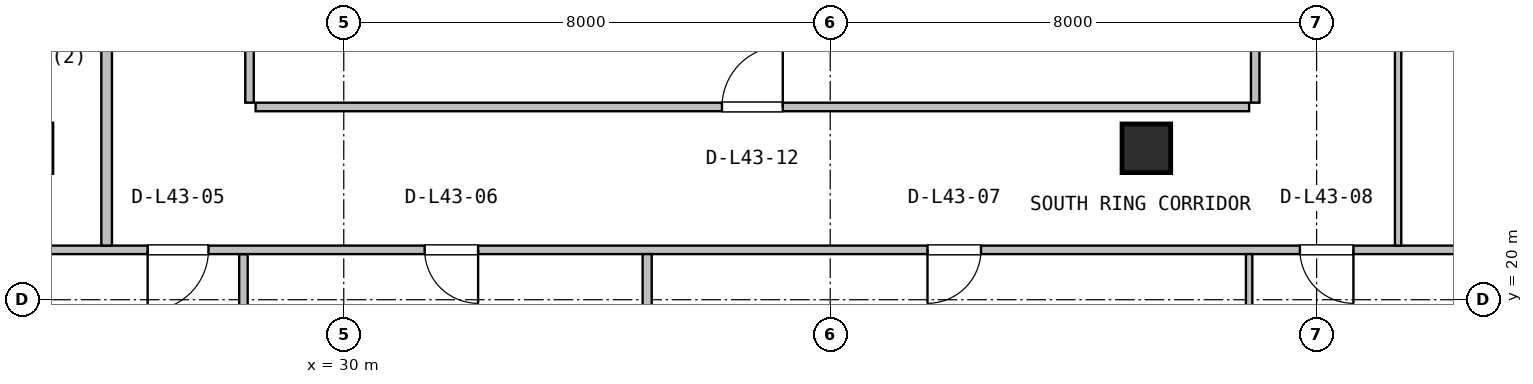
"""IFC4 building model, lengths in metres.
Left out: names, types, materials, properties, quantities, classifications, styles, units other than length and angle.
Written with IfcOpenShell. Run it as: python <this file> out.ifc"""

import sys

from ifc_helpers import new_model, si_unit, direction, frame, frame_2d, origin, origin_2d, place, context, subcontext, project, spatial, rectangle, extrude, source, transform, mapped, element, fill, save


model = new_model("IFC4")
c1 = context("Model", 3, precision=1e-05, world=origin(), true_north=direction((0.0, 1.0)))
c2 = subcontext(c1, "Body", "Model", "MODEL_VIEW")
j1 = project(units=[si_unit("LENGTHUNIT", "METRE"), si_unit("PLANEANGLEUNIT", "RADIAN")], contexts=[c1])
p1 = place(None, origin())
s1 = spatial("IfcSite", under=j1, at=p1, CompositionType="ELEMENT")
p2 = place(p1, origin())
s2 = spatial("IfcBuilding", under=s1, at=p2, CompositionType="ELEMENT")
p3 = place(p2, frame((0.0, 0.0, 176.2)))
s3 = spatial("IfcBuildingStorey", under=s2, at=p3, CompositionType="ELEMENT", Elevation=176.2)
m1 = source(origin(), c2, "Body", "SweptSolid", [
    extrude(rectangle(XDim=0.8, YDim=0.8, at=origin_2d()), origin(), (0.0, 0.0, 1.0), 3.8),
])
for number, where, z_axis, x_axis in (
    (1, (24.8, 22.49, 0.0), (0.0, 0.0, 1.0), (1.0, 0.0, 0.0)),
    (2, (43.2, 22.49, 0.0), (0.0, 0.0, 1.0), (1.0, 0.0, 0.0)),
):
    element("IfcColumn", number, at=place(p3, frame(where, z_axis=z_axis, x_axis=x_axis)), inside=s3, PredefinedType="COLUMN", context=c2, shape_type="MappedRepresentation", body=[
        mapped(m1, transform((0.0, 0.0, 0.0), x_axis=(1.0, 0.0, 0.0), y_axis=(0.0, 1.0, 0.0), z_axis=(0.0, 0.0, 1.0), scale=1.0)),
    ])
p4 = place(p3, frame((28.35, 7.38, 0.0), z_axis=(0.0, 0.0, 1.0), x_axis=(0.0, 1.0, 0.0)))
e3 = element("IfcWall", 3, at=p4, inside=s3, PredefinedType="PARTITIONING", context=c2, shape_type="SweptSolid", body=[
    extrude(rectangle(XDim=13.37, YDim=0.14, at=frame_2d((6.685, 0.0))), origin(), (0.0, 0.0, 1.0), 3.108),
])
p5 = place(p3, frame((7.18, 20.82, 0.0), z_axis=(0.0, 0.0, 1.0), x_axis=(1.0, 0.0, 0.0)))
e4 = element("IfcWall", 4, at=p5, inside=s3, PredefinedType="PARTITIONING", context=c2, shape_type="SweptSolid", body=[
    extrude(rectangle(XDim=53.64, YDim=0.14, at=frame_2d((26.82, 0.0))), origin(), (0.0, 0.0, 1.0), 2.909),
])
p6 = place(p5, frame((19.595, 0.0, 0.0)))
e5 = element("IfcOpeningElement", 5, at=p6, cuts=e4, PredefinedType="OPENING", context=c2, shape_type="SweptSolid", body=[
    extrude(rectangle(XDim=1.0, YDim=2.1, at=frame_2d((0.5, 1.05))), frame((0.0, 0.08, 0.0), z_axis=(0.0, -1.0, 0.0), x_axis=(1.0, 0.0, 0.0)), (0.0, 0.0, 1.0), 0.16),
])
p7 = place(p5, frame((24.15, 0.0, 0.0)))
e6 = element("IfcOpeningElement", 6, at=p7, cuts=e4, PredefinedType="OPENING", context=c2, shape_type="SweptSolid", body=[
    extrude(rectangle(XDim=0.88, YDim=2.06, at=frame_2d((0.44, 1.03))), frame((0.0, 0.08, 0.0), z_axis=(0.0, -1.0, 0.0), x_axis=(1.0, 0.0, 0.0)), (0.0, 0.0, 1.0), 0.16),
])
p8 = place(p5, frame((32.42, 0.0, 0.0)))
e7 = element("IfcOpeningElement", 7, at=p8, cuts=e4, PredefinedType="OPENING", context=c2, shape_type="SweptSolid", body=[
    extrude(rectangle(XDim=0.88, YDim=2.06, at=frame_2d((0.44, 1.03))), frame((0.0, 0.08, 0.0), z_axis=(0.0, -1.0, 0.0), x_axis=(1.0, 0.0, 0.0)), (0.0, 0.0, 1.0), 0.16),
])
p9 = place(p5, frame((38.545, 0.0, 0.0)))
e8 = element("IfcOpeningElement", 8, at=p9, cuts=e4, PredefinedType="OPENING", context=c2, shape_type="SweptSolid", body=[
    extrude(rectangle(XDim=0.88, YDim=2.06, at=frame_2d((0.44, 1.03))), frame((0.0, 0.08, 0.0), z_axis=(0.0, -1.0, 0.0), x_axis=(1.0, 0.0, 0.0)), (0.0, 0.0, 1.0), 0.16),
])
p10 = place(p3, frame((34.99, 7.38, 0.0), z_axis=(0.0, 0.0, 1.0), x_axis=(0.0, 1.0, 0.0)))
e9 = element("IfcWall", 9, at=p10, inside=s3, PredefinedType="PARTITIONING", context=c2, shape_type="SweptSolid", body=[
    extrude(rectangle(XDim=13.37, YDim=0.15, at=frame_2d((6.685, 0.0))), origin(), (0.0, 0.0, 1.0), 3.108),
])
p11 = place(p3, frame((44.89, 7.38, 0.0), z_axis=(0.0, 0.0, 1.0), x_axis=(0.0, 1.0, 0.0)))
e10 = element("IfcWall", 10, at=p11, inside=s3, PredefinedType="PARTITIONING", context=c2, shape_type="SweptSolid", body=[
    extrude(rectangle(XDim=13.37, YDim=0.105, at=frame_2d((6.685, 0.0))), origin(), (0.0, 0.0, 1.0), 3.108),
])
p12 = place(p3, frame((26.1, 20.89, 0.0), z_axis=(0.0, 0.0, 1.0), x_axis=(0.0, 1.0, 0.0)))
e11 = element("IfcWall", 11, at=p12, inside=s3, PredefinedType="PARTITIONING", context=c2, shape_type="SweptSolid", body=[
    extrude(rectangle(XDim=12.407, YDim=0.175, at=frame_2d((6.204, 0.0))), origin(), (0.0, 0.0, 1.0), 2.909),
])
p13 = place(p12, frame((5.67, 0.0, 0.0)))
e12 = element("IfcOpeningElement", 12, at=p13, cuts=e11, PredefinedType="OPENING", context=c2, shape_type="SweptSolid", body=[
    extrude(rectangle(XDim=1.05, YDim=2.1, at=frame_2d((0.525, 1.05))), frame((0.0, 0.098, 0.0), z_axis=(0.0, -1.0, 0.0), x_axis=(1.0, 0.0, 0.0)), (0.0, 0.0, 1.0), 0.195),
])
p14 = place(p3, frame((28.55, 23.17, 0.0), z_axis=(0.0, 0.0, 1.0), x_axis=(1.0, 0.0, 0.0)))
e13 = element("IfcWall", 13, at=p14, inside=s3, PredefinedType="PARTITIONING", context=c2, shape_type="SweptSolid", body=[
    extrude(rectangle(XDim=16.34, YDim=0.14, at=frame_2d((8.17, 0.0))), origin(), (0.0, 0.0, 1.0), 2.909),
])
p15 = place(p14, frame((7.67, 0.0, 0.0)))
e14 = element("IfcOpeningElement", 14, at=p15, cuts=e13, PredefinedType="OPENING", context=c2, shape_type="SweptSolid", body=[
    extrude(rectangle(XDim=1.0, YDim=2.1, at=frame_2d((0.5, 1.05))), frame((0.0, 0.08, 0.0), z_axis=(0.0, -1.0, 0.0), x_axis=(1.0, 0.0, 0.0)), (0.0, 0.0, 1.0), 0.16),
])
for number, where, z_axis, x_axis in (
    (15, (44.99, 23.24, 0.0), (0.0, 0.0, 1.0), (0.0, 1.0, 0.0)),
    (16, (28.45, 23.24, 0.0), (0.0, 0.0, 1.0), (0.0, 1.0, 0.0)),
):
    element("IfcWall", number, at=place(p3, frame(where, z_axis=z_axis, x_axis=x_axis)), inside=s3, PredefinedType="PARTITIONING", context=c2, shape_type="SweptSolid", body=[
        extrude(rectangle(XDim=10.035, YDim=0.14, at=frame_2d((5.018, 0.0))), origin(), (0.0, 0.0, 1.0), 3.222),
    ])
p16 = place(p3, frame((47.34, 20.89, 0.0), z_axis=(0.0, 0.0, 1.0), x_axis=(0.0, 1.0, 0.0)))
e17 = element("IfcWall", 17, at=p16, inside=s3, PredefinedType="PARTITIONING", context=c2, shape_type="SweptSolid", body=[
    extrude(rectangle(XDim=12.407, YDim=0.105, at=frame_2d((6.204, 0.0))), origin(), (0.0, 0.0, 1.0), 3.222),
])
p17 = place(p16, frame((3.24, 0.0, 0.0)))
e18 = element("IfcOpeningElement", 18, at=p17, cuts=e17, PredefinedType="OPENING", context=c2, shape_type="SweptSolid", body=[
    extrude(rectangle(XDim=0.88, YDim=2.06, at=frame_2d((0.44, 1.03))), frame((0.0, 0.062, 0.0), z_axis=(0.0, -1.0, 0.0), x_axis=(1.0, 0.0, 0.0)), (0.0, 0.0, 1.0), 0.125),
])
m2 = source(origin(), c2, "Body", "SweptSolid", [
    extrude(rectangle(XDim=1.0, YDim=2.1, at=frame_2d((0.5, 1.05))), frame((0.0, 0.025, 0.0), z_axis=(0.0, -1.0, 0.0), x_axis=(1.0, 0.0, 0.0)), (0.0, 0.0, 1.0), 0.05),
])
p18 = place(p6, frame((1.0, 0.0, 0.0), z_axis=(0.0, 0.0, 1.0), x_axis=(-1.0, 0.0, 0.0)))
e19 = element("IfcDoor", 19, at=p18, inside=s3, OperationType="SINGLE_SWING_LEFT", PredefinedType="DOOR", context=c2, shape_type="MappedRepresentation", body=[
    mapped(m2, transform((0.0, 0.0, 0.0), x_axis=(1.0, 0.0, 0.0), y_axis=(0.0, 1.0, 0.0), z_axis=(0.0, 0.0, 1.0), scale=1.0)),
])
fill(e5, e19)
m3 = source(origin(), c2, "Body", "SweptSolid", [
    extrude(rectangle(XDim=0.88, YDim=2.06, at=frame_2d((0.44, 1.03))), frame((0.0, 0.025, 0.0), z_axis=(0.0, -1.0, 0.0), x_axis=(1.0, 0.0, 0.0)), (0.0, 0.0, 1.0), 0.05),
])
p19 = place(p7, frame((0.88, 0.0, 0.0), z_axis=(0.0, 0.0, 1.0), x_axis=(-1.0, 0.0, 0.0)))
e20 = element("IfcDoor", 20, at=p19, inside=s3, OperationType="SINGLE_SWING_RIGHT", PredefinedType="DOOR", context=c2, shape_type="MappedRepresentation", body=[
    mapped(m3, transform((0.0, 0.0, 0.0), x_axis=(1.0, 0.0, 0.0), y_axis=(0.0, 1.0, 0.0), z_axis=(0.0, 0.0, 1.0), scale=1.0)),
])
fill(e6, e20)
p20 = place(p8, frame((0.88, 0.0, 0.0), z_axis=(0.0, 0.0, 1.0), x_axis=(-1.0, 0.0, 0.0)))
e21 = element("IfcDoor", 21, at=p20, inside=s3, OperationType="SINGLE_SWING_LEFT", PredefinedType="DOOR", context=c2, shape_type="MappedRepresentation", body=[
    mapped(m3, transform((0.0, 0.0, 0.0), x_axis=(1.0, 0.0, 0.0), y_axis=(0.0, 1.0, 0.0), z_axis=(0.0, 0.0, 1.0), scale=1.0)),
])
fill(e7, e21)
p21 = place(p9, frame((0.88, 0.0, 0.0), z_axis=(0.0, 0.0, 1.0), x_axis=(-1.0, 0.0, 0.0)))
e22 = element("IfcDoor", 22, at=p21, inside=s3, OperationType="SINGLE_SWING_RIGHT", PredefinedType="DOOR", context=c2, shape_type="MappedRepresentation", body=[
    mapped(m3, transform((0.0, 0.0, 0.0), x_axis=(1.0, 0.0, 0.0), y_axis=(0.0, 1.0, 0.0), z_axis=(0.0, 0.0, 1.0), scale=1.0)),
])
fill(e8, e22)
p22 = place(p15, origin())
e23 = element("IfcDoor", 23, at=p22, inside=s3, OperationType="SINGLE_SWING_RIGHT", PredefinedType="DOOR", context=c2, shape_type="MappedRepresentation", body=[
    mapped(m2, transform((0.0, 0.0, 0.0), x_axis=(1.0, 0.0, 0.0), y_axis=(0.0, 1.0, 0.0), z_axis=(0.0, 0.0, 1.0), scale=1.0)),
])
fill(e14, e23)
save(model, sys.argv[1])
